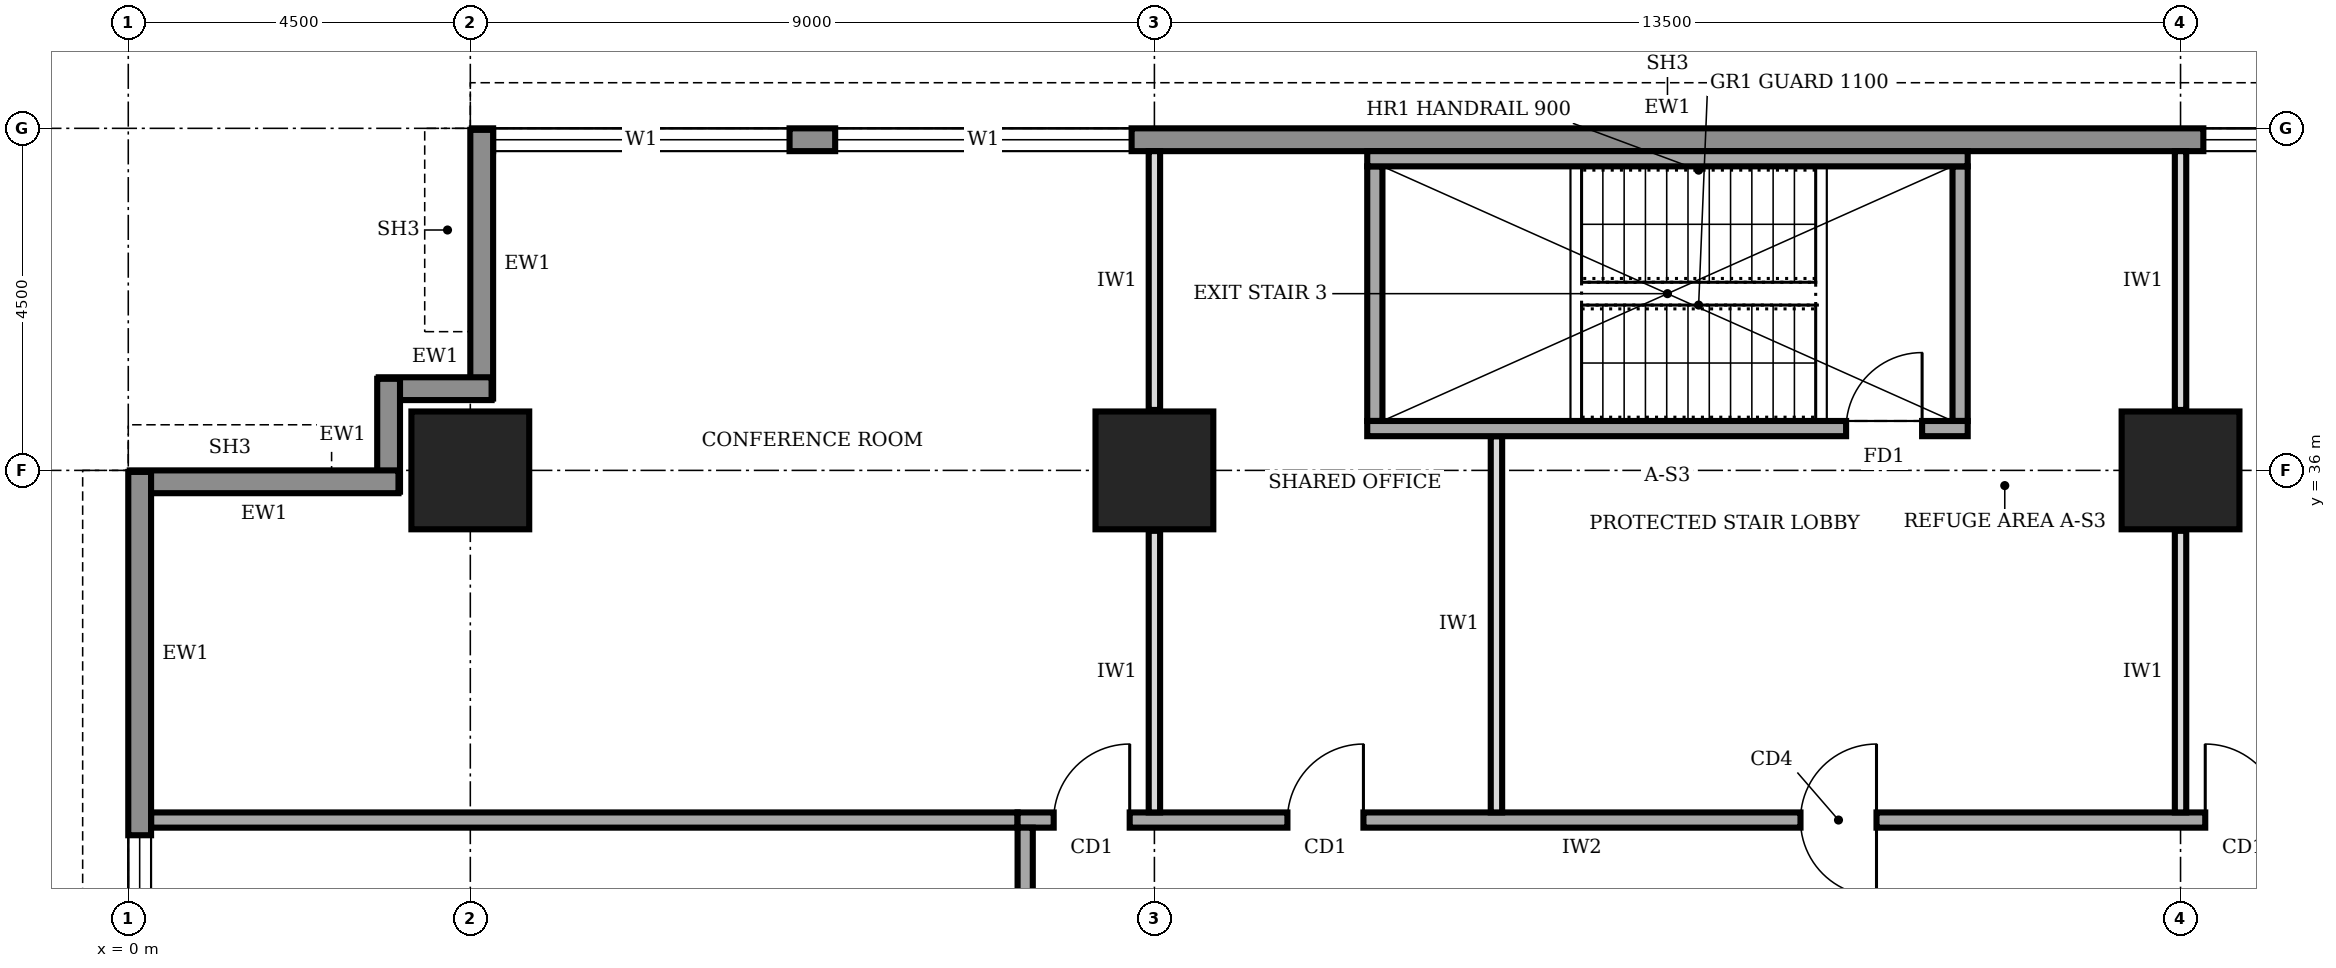
"""IFC4 building model, lengths in metres.
Left out: names, types, materials, properties, quantities, classifications, styles, units other than length and angle.
Written with IfcOpenShell. Run it as: python <this file> out.ifc"""

import sys

from ifc_helpers import new_model, si_unit, direction, frame, frame_2d, origin, origin_2d, place, context, subcontext, project, spatial, rectangle, extrude, element, fill, save


model = new_model("IFC4")
c1 = context("Model", 3, precision=1e-05, world=origin(), true_north=direction((0.0, 1.0)))
c2 = subcontext(c1, "Body", "Model", "MODEL_VIEW")
j1 = project(units=[si_unit("LENGTHUNIT", "METRE"), si_unit("PLANEANGLEUNIT", "RADIAN")], contexts=[c1])
p1 = place(None, origin())
s1 = spatial("IfcSite", under=j1, at=p1, CompositionType="ELEMENT")
p2 = place(p1, origin())
s2 = spatial("IfcBuilding", under=s1, at=p2, CompositionType="ELEMENT")
p3 = place(p2, frame((0.0, 0.0, 213.0)))
s3 = spatial("IfcBuildingStorey", under=s2, at=p3, CompositionType="ELEMENT", Elevation=213.0)
for number, where, z_axis, x_axis in (
    (1, (4.5, 36.0, 0.0), (0.0, 0.0, 1.0), (1.0, 0.0, 0.0)),
    (2, (13.5, 36.0, 0.0), (0.0, 0.0, 1.0), (1.0, 0.0, 0.0)),
    (3, (27.0, 36.0, 0.0), (0.0, 0.0, 1.0), (1.0, 0.0, 0.0)),
):
    element("IfcColumn", number, at=place(p3, frame(where, z_axis=z_axis, x_axis=x_axis)), inside=s3, PredefinedType="COLUMN", context=c2, shape_type="SweptSolid", body=[
        extrude(rectangle(XDim=1.55, YDim=1.55, at=origin_2d()), origin(), (0.0, 0.0, 1.0), 4.0),
    ])
p4 = place(p3, frame((35.98, 40.35, 0.0), z_axis=(0.0, 0.0, 1.0), x_axis=(-1.0, 0.0, 0.0)))
e4 = element("IfcWall", 4, at=p4, inside=s3, PredefinedType="STANDARD", context=c2, shape_type="SweptSolid", body=[
    extrude(rectangle(XDim=31.46, YDim=0.3, at=frame_2d((15.73, 0.0))), origin(), (0.0, 0.0, 1.0), 3.75),
])
p5 = place(p4, frame((27.28, 0.0, 0.9)))
e5 = element("IfcOpeningElement", 5, at=p5, cuts=e4, PredefinedType="OPENING", context=c2, shape_type="SweptSolid", body=[
    extrude(rectangle(XDim=3.9, YDim=2.2, at=frame_2d((1.95, 1.1))), frame((0.0, 0.16, 0.0), z_axis=(0.0, -1.0, 0.0), x_axis=(1.0, 0.0, 0.0)), (0.0, 0.0, 1.0), 0.32),
])
p6 = place(p4, frame((22.78, 0.0, 0.9)))
e6 = element("IfcOpeningElement", 6, at=p6, cuts=e4, PredefinedType="OPENING", context=c2, shape_type="SweptSolid", body=[
    extrude(rectangle(XDim=3.9, YDim=2.2, at=frame_2d((1.95, 1.1))), frame((0.0, 0.16, 0.0), z_axis=(0.0, -1.0, 0.0), x_axis=(1.0, 0.0, 0.0)), (0.0, 0.0, 1.0), 0.32),
])
p7 = place(p4, frame((4.78, 0.0, 0.9)))
e7 = element("IfcOpeningElement", 7, at=p7, cuts=e4, PredefinedType="OPENING", context=c2, shape_type="SweptSolid", body=[
    extrude(rectangle(XDim=3.9, YDim=2.2, at=frame_2d((1.95, 1.1))), frame((0.0, 0.16, 0.0), z_axis=(0.0, -1.0, 0.0), x_axis=(1.0, 0.0, 0.0)), (0.0, 0.0, 1.0), 0.32),
])
p8 = place(p3, frame((4.65, 40.48, 0.0), z_axis=(0.0, 0.0, 1.0), x_axis=(0.0, -1.0, 0.0)))
e8 = element("IfcWall", 8, at=p8, inside=s3, PredefinedType="STANDARD", context=c2, shape_type="SweptSolid", body=[
    extrude(rectangle(XDim=3.535, YDim=0.3, at=frame_2d((1.768, 0.0))), origin(), (0.0, 0.0, 1.0), 2.85),
])
for number, where, z_axis, x_axis in (
    (9, (4.78, 37.075, 0.0), (0.0, 0.0, 1.0), (-1.0, 0.0, 0.0)),
    (10, (3.425, 37.205, 0.0), (0.0, 0.0, 1.0), (0.0, -1.0, 0.0)),
):
    element("IfcWall", number, at=place(p3, frame(where, z_axis=z_axis, x_axis=x_axis)), inside=s3, PredefinedType="STANDARD", context=c2, shape_type="SweptSolid", body=[
        extrude(rectangle(XDim=1.485, YDim=0.3, at=frame_2d((0.743, 0.0))), origin(), (0.0, 0.0, 1.0), 3.75),
    ])
p9 = place(p3, frame((3.555, 35.85, 0.0), z_axis=(0.0, 0.0, 1.0), x_axis=(-1.0, 0.0, 0.0)))
e11 = element("IfcWall", 11, at=p9, inside=s3, PredefinedType="STANDARD", context=c2, shape_type="SweptSolid", body=[
    extrude(rectangle(XDim=3.535, YDim=0.3, at=frame_2d((1.768, 0.0))), origin(), (0.0, 0.0, 1.0), 2.85),
])
p10 = place(p3, frame((0.15, 35.98, 0.0), z_axis=(0.0, 0.0, 1.0), x_axis=(0.0, -1.0, 0.0)))
e12 = element("IfcWall", 12, at=p10, inside=s3, PredefinedType="STANDARD", context=c2, shape_type="SweptSolid", body=[
    extrude(rectangle(XDim=31.46, YDim=0.3, at=frame_2d((15.73, 0.0))), origin(), (0.0, 0.0, 1.0), 3.75),
])
p11 = place(p10, frame((27.28, 0.0, 0.9)))
e13 = element("IfcOpeningElement", 13, at=p11, cuts=e12, PredefinedType="OPENING", context=c2, shape_type="SweptSolid", body=[
    extrude(rectangle(XDim=3.9, YDim=2.2, at=frame_2d((1.95, 1.1))), frame((0.0, 0.16, 0.0), z_axis=(0.0, -1.0, 0.0), x_axis=(1.0, 0.0, 0.0)), (0.0, 0.0, 1.0), 0.32),
])
p12 = place(p10, frame((22.78, 0.0, 0.9)))
e14 = element("IfcOpeningElement", 14, at=p12, cuts=e12, PredefinedType="OPENING", context=c2, shape_type="SweptSolid", body=[
    extrude(rectangle(XDim=3.9, YDim=2.2, at=frame_2d((1.95, 1.1))), frame((0.0, 0.16, 0.0), z_axis=(0.0, -1.0, 0.0), x_axis=(1.0, 0.0, 0.0)), (0.0, 0.0, 1.0), 0.32),
])
p13 = place(p10, frame((18.28, 0.0, 0.9)))
e15 = element("IfcOpeningElement", 15, at=p13, cuts=e12, PredefinedType="OPENING", context=c2, shape_type="SweptSolid", body=[
    extrude(rectangle(XDim=3.9, YDim=2.2, at=frame_2d((1.95, 1.1))), frame((0.0, 0.16, 0.0), z_axis=(0.0, -1.0, 0.0), x_axis=(1.0, 0.0, 0.0)), (0.0, 0.0, 1.0), 0.32),
])
p14 = place(p10, frame((13.78, 0.0, 0.9)))
e16 = element("IfcOpeningElement", 16, at=p14, cuts=e12, PredefinedType="OPENING", context=c2, shape_type="SweptSolid", body=[
    extrude(rectangle(XDim=3.9, YDim=2.2, at=frame_2d((1.95, 1.1))), frame((0.0, 0.16, 0.0), z_axis=(0.0, -1.0, 0.0), x_axis=(1.0, 0.0, 0.0)), (0.0, 0.0, 1.0), 0.32),
])
p15 = place(p10, frame((9.28, 0.0, 0.9)))
e17 = element("IfcOpeningElement", 17, at=p15, cuts=e12, PredefinedType="OPENING", context=c2, shape_type="SweptSolid", body=[
    extrude(rectangle(XDim=3.9, YDim=2.2, at=frame_2d((1.95, 1.1))), frame((0.0, 0.16, 0.0), z_axis=(0.0, -1.0, 0.0), x_axis=(1.0, 0.0, 0.0)), (0.0, 0.0, 1.0), 0.32),
])
p16 = place(p10, frame((4.78, 0.0, 0.9)))
e18 = element("IfcOpeningElement", 18, at=p16, cuts=e12, PredefinedType="OPENING", context=c2, shape_type="SweptSolid", body=[
    extrude(rectangle(XDim=3.9, YDim=2.2, at=frame_2d((1.95, 1.1))), frame((0.0, 0.16, 0.0), z_axis=(0.0, -1.0, 0.0), x_axis=(1.0, 0.0, 0.0)), (0.0, 0.0, 1.0), 0.32),
])
p17 = place(p3, frame((28.6, 31.4, 0.0), z_axis=(0.0, 0.0, 1.0), x_axis=(-1.0, 0.0, 0.0)))
e19 = element("IfcWall", 19, at=p17, inside=s3, PredefinedType="SOLIDWALL", context=c2, shape_type="SweptSolid", body=[
    extrude(rectangle(XDim=16.9, YDim=0.2, at=frame_2d((8.45, 0.0))), origin(), (0.0, 0.0, 1.0), 3.75),
])
p18 = place(p17, frame((15.425, 0.0, 0.0)))
e20 = element("IfcOpeningElement", 20, at=p18, cuts=e19, PredefinedType="OPENING", context=c2, shape_type="SweptSolid", body=[
    extrude(rectangle(XDim=1.0, YDim=2.1, at=frame_2d((0.5, 1.05))), frame((0.0, 0.11, 0.0), z_axis=(0.0, -1.0, 0.0), x_axis=(1.0, 0.0, 0.0)), (0.0, 0.0, 1.0), 0.22),
])
p19 = place(p17, frame((12.35, 0.0, 0.0)))
e21 = element("IfcOpeningElement", 21, at=p19, cuts=e19, PredefinedType="OPENING", context=c2, shape_type="SweptSolid", body=[
    extrude(rectangle(XDim=1.0, YDim=2.1, at=frame_2d((0.5, 1.05))), frame((0.0, 0.11, 0.0), z_axis=(0.0, -1.0, 0.0), x_axis=(1.0, 0.0, 0.0)), (0.0, 0.0, 1.0), 0.22),
])
p20 = place(p17, frame((5.6, 0.0, 0.0)))
e22 = element("IfcOpeningElement", 22, at=p20, cuts=e19, PredefinedType="OPENING", context=c2, shape_type="SweptSolid", body=[
    extrude(rectangle(XDim=1.0, YDim=2.1, at=frame_2d((0.5, 1.05))), frame((0.0, 0.11, 0.0), z_axis=(0.0, -1.0, 0.0), x_axis=(1.0, 0.0, 0.0)), (0.0, 0.0, 1.0), 0.22),
])
p21 = place(p17, frame((0.275, 0.0, 0.0)))
e23 = element("IfcOpeningElement", 23, at=p21, cuts=e19, PredefinedType="OPENING", context=c2, shape_type="SweptSolid", body=[
    extrude(rectangle(XDim=1.0, YDim=2.1, at=frame_2d((0.5, 1.05))), frame((0.0, 0.11, 0.0), z_axis=(0.0, -1.0, 0.0), x_axis=(1.0, 0.0, 0.0)), (0.0, 0.0, 1.0), 0.22),
])
p22 = place(p3, frame((11.8, 31.3, 0.0), z_axis=(0.0, 0.0, 1.0), x_axis=(0.0, -1.0, 0.0)))
e24 = element("IfcWall", 24, at=p22, inside=s3, PredefinedType="SOLIDWALL", context=c2, shape_type="SweptSolid", body=[
    extrude(rectangle(XDim=23.8, YDim=0.2, at=frame_2d((11.9, 0.0))), origin(), (0.0, 0.0, 1.0), 3.75),
])
p23 = place(p22, frame((20.3, 0.0, 0.0)))
e25 = element("IfcOpeningElement", 25, at=p23, cuts=e24, PredefinedType="OPENING", context=c2, shape_type="SweptSolid", body=[
    extrude(rectangle(XDim=1.0, YDim=2.1, at=frame_2d((0.5, 1.05))), frame((0.0, 0.11, 0.0), z_axis=(0.0, -1.0, 0.0), x_axis=(1.0, 0.0, 0.0)), (0.0, 0.0, 1.0), 0.22),
])
p24 = place(p22, frame((16.15, 0.0, 0.0)))
e26 = element("IfcOpeningElement", 26, at=p24, cuts=e24, PredefinedType="OPENING", context=c2, shape_type="SweptSolid", body=[
    extrude(rectangle(XDim=0.9, YDim=2.1, at=frame_2d((0.45, 1.05))), frame((0.0, 0.11, 0.0), z_axis=(0.0, -1.0, 0.0), x_axis=(1.0, 0.0, 0.0)), (0.0, 0.0, 1.0), 0.22),
])
p25 = place(p22, frame((12.95, 0.0, 0.0)))
e27 = element("IfcOpeningElement", 27, at=p25, cuts=e24, PredefinedType="OPENING", context=c2, shape_type="SweptSolid", body=[
    extrude(rectangle(XDim=0.9, YDim=2.1, at=frame_2d((0.45, 1.05))), frame((0.0, 0.11, 0.0), z_axis=(0.0, -1.0, 0.0), x_axis=(1.0, 0.0, 0.0)), (0.0, 0.0, 1.0), 0.22),
])
p26 = place(p22, frame((7.4, 0.0, 0.0)))
e28 = element("IfcOpeningElement", 28, at=p26, cuts=e24, PredefinedType="OPENING", context=c2, shape_type="SweptSolid", body=[
    extrude(rectangle(XDim=0.9, YDim=2.1, at=frame_2d((0.45, 1.05))), frame((0.0, 0.11, 0.0), z_axis=(0.0, -1.0, 0.0), x_axis=(1.0, 0.0, 0.0)), (0.0, 0.0, 1.0), 0.22),
])
p27 = place(p22, frame((4.8, 0.0, 0.0)))
e29 = element("IfcOpeningElement", 29, at=p27, cuts=e24, PredefinedType="OPENING", context=c2, shape_type="SweptSolid", body=[
    extrude(rectangle(XDim=1.0, YDim=2.1, at=frame_2d((0.5, 1.05))), frame((0.0, 0.11, 0.0), z_axis=(0.0, -1.0, 0.0), x_axis=(1.0, 0.0, 0.0)), (0.0, 0.0, 1.0), 0.22),
])
p28 = place(p22, frame((9.9, 0.0, 0.0)))
e30 = element("IfcOpeningElement", 30, at=p28, cuts=e24, PredefinedType="OPENING", context=c2, shape_type="SweptSolid", body=[
    extrude(rectangle(XDim=1.0, YDim=2.1, at=frame_2d((0.5, 1.05))), frame((0.0, 0.11, 0.0), z_axis=(0.0, -1.0, 0.0), x_axis=(1.0, 0.0, 0.0)), (0.0, 0.0, 1.0), 0.22),
])
p29 = place(p22, frame((1.55, 0.0, 0.0)))
e31 = element("IfcOpeningElement", 31, at=p29, cuts=e24, PredefinedType="OPENING", context=c2, shape_type="SweptSolid", body=[
    extrude(rectangle(XDim=1.0, YDim=2.1, at=frame_2d((0.5, 1.05))), frame((0.0, 0.11, 0.0), z_axis=(0.0, -1.0, 0.0), x_axis=(1.0, 0.0, 0.0)), (0.0, 0.0, 1.0), 0.22),
])
p30 = place(p3, frame((0.3, 31.4, 0.0), z_axis=(0.0, 0.0, 1.0), x_axis=(1.0, 0.0, 0.0)))
e32 = element("IfcWall", 32, at=p30, inside=s3, PredefinedType="SOLIDWALL", context=c2, shape_type="SweptSolid", body=[
    extrude(rectangle(XDim=11.4, YDim=0.2, at=frame_2d((5.7, 0.0))), origin(), (0.0, 0.0, 1.0), 3.75),
])
p31 = place(p3, frame((13.5, 31.5, 0.0), z_axis=(0.0, 0.0, 1.0), x_axis=(0.0, 1.0, 0.0)))
e33 = element("IfcWall", 33, at=p31, inside=s3, PredefinedType="PARTITIONING", context=c2, shape_type="SweptSolid", body=[
    extrude(rectangle(XDim=3.705, YDim=0.15, at=frame_2d((1.853, 0.0))), origin(), (0.0, 0.0, 1.0), 2.85),
])
p32 = place(p3, frame((13.5, 36.795, 0.0), z_axis=(0.0, 0.0, 1.0), x_axis=(0.0, 1.0, 0.0)))
e34 = element("IfcWall", 34, at=p32, inside=s3, PredefinedType="PARTITIONING", context=c2, shape_type="SweptSolid", body=[
    extrude(rectangle(XDim=3.405, YDim=0.15, at=frame_2d((1.703, 0.0))), origin(), (0.0, 0.0, 1.0), 2.85),
])
p33 = place(p3, frame((18.0, 31.5, 0.0), z_axis=(0.0, 0.0, 1.0), x_axis=(0.0, 1.0, 0.0)))
e35 = element("IfcWall", 35, at=p33, inside=s3, PredefinedType="PARTITIONING", context=c2, shape_type="SweptSolid", body=[
    extrude(rectangle(XDim=4.95, YDim=0.15, at=frame_2d((2.475, 0.0))), origin(), (0.0, 0.0, 1.0), 3.75),
])
p34 = place(p3, frame((27.0, 31.5, 0.0), z_axis=(0.0, 0.0, 1.0), x_axis=(0.0, 1.0, 0.0)))
e36 = element("IfcWall", 36, at=p34, inside=s3, PredefinedType="PARTITIONING", context=c2, shape_type="SweptSolid", body=[
    extrude(rectangle(XDim=3.705, YDim=0.15, at=frame_2d((1.853, 0.0))), origin(), (0.0, 0.0, 1.0), 2.85),
])
p35 = place(p3, frame((27.0, 36.795, 0.0), z_axis=(0.0, 0.0, 1.0), x_axis=(0.0, 1.0, 0.0)))
e37 = element("IfcWall", 37, at=p35, inside=s3, PredefinedType="PARTITIONING", context=c2, shape_type="SweptSolid", body=[
    extrude(rectangle(XDim=3.405, YDim=0.15, at=frame_2d((1.703, 0.0))), origin(), (0.0, 0.0, 1.0), 2.85),
])
p36 = place(p3, frame((16.3, 36.55, 0.0), z_axis=(0.0, 0.0, 1.0), x_axis=(1.0, 0.0, 0.0)))
e38 = element("IfcWall", 38, at=p36, inside=s3, PredefinedType="SOLIDWALL", context=c2, shape_type="SweptSolid", body=[
    extrude(rectangle(XDim=7.9, YDim=0.2, at=frame_2d((3.95, 0.0))), origin(), (0.0, 0.0, 1.0), 3.75),
])
p37 = place(p36, frame((6.3, 0.0, 0.0)))
e39 = element("IfcOpeningElement", 39, at=p37, cuts=e38, PredefinedType="OPENING", context=c2, shape_type="SweptSolid", body=[
    extrude(rectangle(XDim=1.0, YDim=2.1, at=frame_2d((0.5, 1.05))), frame((0.0, 0.11, 0.0), z_axis=(0.0, -1.0, 0.0), x_axis=(1.0, 0.0, 0.0)), (0.0, 0.0, 1.0), 0.22),
])
p38 = place(p3, frame((16.3, 40.1, 0.0), z_axis=(0.0, 0.0, 1.0), x_axis=(1.0, 0.0, 0.0)))
e40 = element("IfcWall", 40, at=p38, inside=s3, PredefinedType="SOLIDWALL", context=c2, shape_type="SweptSolid", body=[
    extrude(rectangle(XDim=7.9, YDim=0.2, at=frame_2d((3.95, 0.0))), origin(), (0.0, 0.0, 1.0), 3.75),
])
for number, where, z_axis, x_axis in (
    (41, (16.4, 36.65, 0.0), (0.0, 0.0, 1.0), (0.0, 1.0, 0.0)),
    (42, (24.1, 36.65, 0.0), (0.0, 0.0, 1.0), (0.0, 1.0, 0.0)),
):
    element("IfcWall", number, at=place(p3, frame(where, z_axis=z_axis, x_axis=x_axis)), inside=s3, PredefinedType="SOLIDWALL", context=c2, shape_type="SweptSolid", body=[
        extrude(rectangle(XDim=3.35, YDim=0.2, at=frame_2d((1.675, 0.0))), origin(), (0.0, 0.0, 1.0), 3.75),
    ])
p39 = place(p5, origin())
e43 = element("IfcWindow", 43, at=p39, inside=s3, PartitioningType="SINGLE_PANEL", PredefinedType="WINDOW", context=c2, shape_type="SweptSolid", body=[
    extrude(rectangle(XDim=3.9, YDim=2.2, at=frame_2d((1.95, 1.1))), frame((0.0, 0.03, 0.0), z_axis=(0.0, -1.0, 0.0), x_axis=(1.0, 0.0, 0.0)), (0.0, 0.0, 1.0), 0.06),
])
fill(e5, e43)
p40 = place(p6, origin())
e44 = element("IfcWindow", 44, at=p40, inside=s3, PartitioningType="SINGLE_PANEL", PredefinedType="WINDOW", context=c2, shape_type="SweptSolid", body=[
    extrude(rectangle(XDim=3.9, YDim=2.2, at=frame_2d((1.95, 1.1))), frame((0.0, 0.03, 0.0), z_axis=(0.0, -1.0, 0.0), x_axis=(1.0, 0.0, 0.0)), (0.0, 0.0, 1.0), 0.06),
])
fill(e6, e44)
p41 = place(p7, origin())
e45 = element("IfcWindow", 45, at=p41, inside=s3, PartitioningType="SINGLE_PANEL", PredefinedType="WINDOW", context=c2, shape_type="SweptSolid", body=[
    extrude(rectangle(XDim=3.9, YDim=2.2, at=frame_2d((1.95, 1.1))), frame((0.0, 0.03, 0.0), z_axis=(0.0, -1.0, 0.0), x_axis=(1.0, 0.0, 0.0)), (0.0, 0.0, 1.0), 0.06),
])
fill(e7, e45)
p42 = place(p16, origin())
e46 = element("IfcWindow", 46, at=p42, inside=s3, PartitioningType="SINGLE_PANEL", PredefinedType="WINDOW", context=c2, shape_type="SweptSolid", body=[
    extrude(rectangle(XDim=3.9, YDim=2.2, at=frame_2d((1.95, 1.1))), frame((0.0, 0.03, 0.0), z_axis=(0.0, -1.0, 0.0), x_axis=(1.0, 0.0, 0.0)), (0.0, 0.0, 1.0), 0.06),
])
fill(e18, e46)
p43 = place(p18, frame((1.0, 0.0, 0.0), z_axis=(0.0, 0.0, 1.0), x_axis=(-1.0, 0.0, 0.0)))
e47 = element("IfcDoor", 47, at=p43, inside=s3, OperationType="SINGLE_SWING_RIGHT", PredefinedType="DOOR", context=c2, shape_type="SweptSolid", body=[
    extrude(rectangle(XDim=1.0, YDim=2.1, at=frame_2d((0.5, 1.05))), frame((0.0, 0.025, 0.0), z_axis=(0.0, -1.0, 0.0), x_axis=(1.0, 0.0, 0.0)), (0.0, 0.0, 1.0), 0.05),
])
fill(e20, e47)
p44 = place(p19, frame((1.0, 0.0, 0.0), z_axis=(0.0, 0.0, 1.0), x_axis=(-1.0, 0.0, 0.0)))
e48 = element("IfcDoor", 48, at=p44, inside=s3, OperationType="SINGLE_SWING_RIGHT", PredefinedType="DOOR", context=c2, shape_type="SweptSolid", body=[
    extrude(rectangle(XDim=1.0, YDim=2.1, at=frame_2d((0.5, 1.05))), frame((0.0, 0.025, 0.0), z_axis=(0.0, -1.0, 0.0), x_axis=(1.0, 0.0, 0.0)), (0.0, 0.0, 1.0), 0.05),
])
fill(e21, e48)
p45 = place(p20, origin())
e49 = element("IfcDoor", 49, at=p45, inside=s3, OperationType="DOUBLE_SWING_LEFT", PredefinedType="DOOR", context=c2, shape_type="SweptSolid", body=[
    extrude(rectangle(XDim=1.0, YDim=2.1, at=frame_2d((0.5, 1.05))), frame((0.0, 0.025, 0.0), z_axis=(0.0, -1.0, 0.0), x_axis=(1.0, 0.0, 0.0)), (0.0, 0.0, 1.0), 0.05),
])
fill(e22, e49)
p46 = place(p21, frame((1.0, 0.0, 0.0), z_axis=(0.0, 0.0, 1.0), x_axis=(-1.0, 0.0, 0.0)))
e50 = element("IfcDoor", 50, at=p46, inside=s3, OperationType="SINGLE_SWING_LEFT", PredefinedType="DOOR", context=c2, shape_type="SweptSolid", body=[
    extrude(rectangle(XDim=1.0, YDim=2.1, at=frame_2d((0.5, 1.05))), frame((0.0, 0.025, 0.0), z_axis=(0.0, -1.0, 0.0), x_axis=(1.0, 0.0, 0.0)), (0.0, 0.0, 1.0), 0.05),
])
fill(e23, e50)
p47 = place(p37, origin())
e51 = element("IfcDoor", 51, at=p47, inside=s3, OperationType="SINGLE_SWING_RIGHT", PredefinedType="DOOR", context=c2, shape_type="SweptSolid", body=[
    extrude(rectangle(XDim=1.0, YDim=2.1, at=frame_2d((0.5, 1.05))), frame((0.0, 0.025, 0.0), z_axis=(0.0, -1.0, 0.0), x_axis=(1.0, 0.0, 0.0)), (0.0, 0.0, 1.0), 0.05),
])
fill(e39, e51)
save(model, sys.argv[1])
